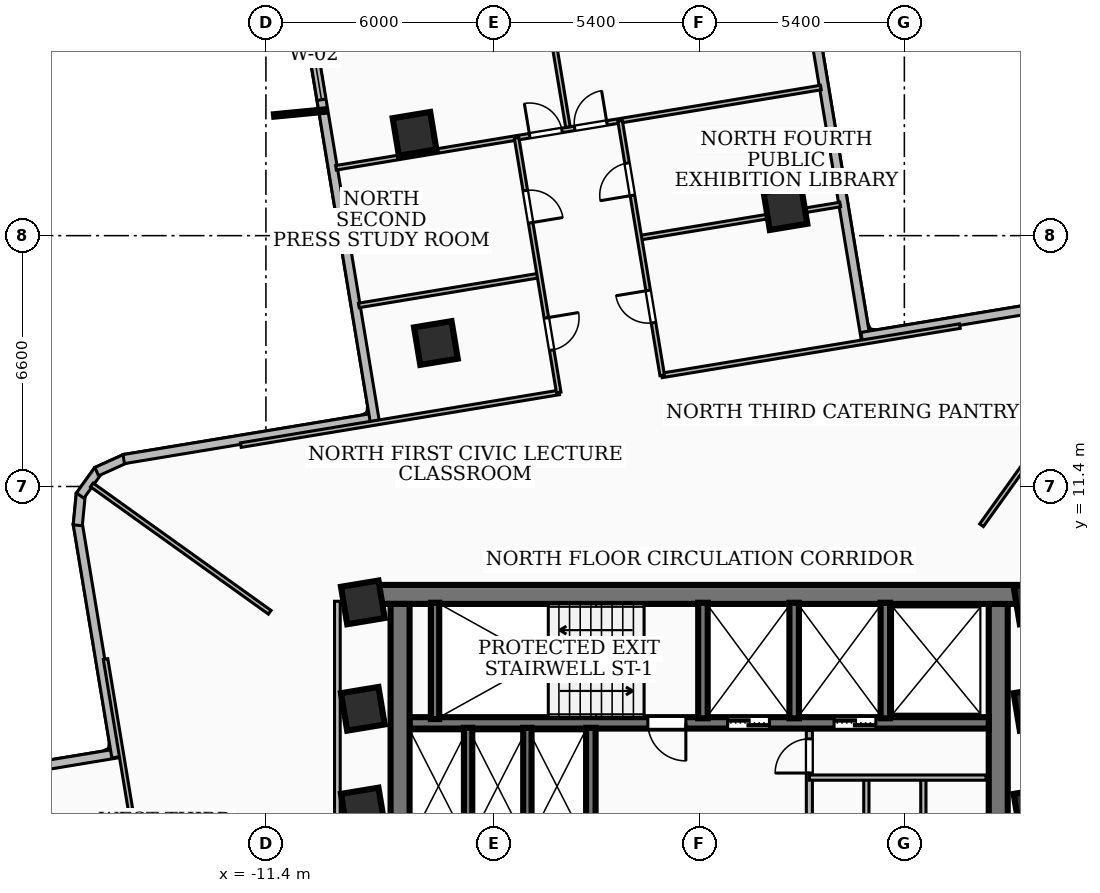
"""IFC4 building model, lengths in metres.
Left out: names, types, materials, properties, quantities, classifications, styles, units other than length and angle.
Written with IfcOpenShell. Run it as: python <this file> out.ifc"""

import sys

from ifc_helpers import new_model, si_unit, direction, frame, frame_2d, origin, origin_2d, place, context, subcontext, project, spatial, rectangle, extrude, element, fill, save


model = new_model("IFC4")
c1 = context("Model", 3, precision=1e-05, world=origin(), true_north=direction((0.0, 1.0)))
c2 = subcontext(c1, "Body", "Model", "MODEL_VIEW")
j1 = project(units=[si_unit("LENGTHUNIT", "METRE"), si_unit("PLANEANGLEUNIT", "RADIAN")], contexts=[c1])
p1 = place(None, origin())
s1 = spatial("IfcSite", under=j1, at=p1, CompositionType="ELEMENT")
p2 = place(p1, origin())
s2 = spatial("IfcBuilding", under=s1, at=p2, CompositionType="ELEMENT")
p3 = place(p2, frame((0.0, 0.0, 92.88)))
s3 = spatial("IfcBuildingStorey", under=s2, at=p3, CompositionType="ELEMENT", Elevation=92.88)
p4 = place(p3, frame((-8.78, 8.56, 0.0), z_axis=(0.0, 0.0, 1.0), x_axis=(1.0, 0.0, 0.0)))
e1 = element("IfcWall", 1, at=p4, inside=s3, PredefinedType="SHEAR", context=c2, shape_type="SweptSolid", body=[
    extrude(rectangle(XDim=17.56, YDim=0.5, at=frame_2d((8.78, 0.0))), origin(), (0.0, 0.0, 1.0), 3.34),
])
for number, where, z_axis, x_axis in (
    (2, (-7.87, 2.0, 0.0), (0.0, 0.0, 1.0), (0.0, 1.0, 0.0)),
    (3, (7.87, 8.31, 0.0), (0.0, 0.0, 1.0), (0.0, -1.0, 0.0)),
):
    element("IfcWall", number, at=place(p3, frame(where, z_axis=z_axis, x_axis=x_axis)), inside=s3, PredefinedType="SHEAR", context=c2, shape_type="SweptSolid", body=[
        extrude(rectangle(XDim=6.31, YDim=0.5, at=frame_2d((3.155, 0.0))), origin(), (0.0, 0.0, 1.0), 3.34),
    ])
p5 = place(p3, frame((7.62, 5.18, 0.0), z_axis=(0.0, 0.0, 1.0), x_axis=(-1.0, 0.0, 0.0)))
e4 = element("IfcWall", 4, at=p5, inside=s3, PredefinedType="SOLIDWALL", context=c2, shape_type="SweptSolid", body=[
    extrude(rectangle(XDim=15.24, YDim=0.3, at=frame_2d((7.62, 0.0))), origin(), (0.0, 0.0, 1.0), 3.34),
])
p6 = place(p5, frame((5.77, 0.0, 0.0)))
e5 = element("IfcOpeningElement", 5, at=p6, cuts=e4, PredefinedType="OPENING", context=c2, shape_type="SweptSolid", body=[
    extrude(rectangle(XDim=1.1, YDim=2.15, at=frame_2d((0.55, 1.075))), frame((0.0, 0.16, 0.0), z_axis=(0.0, -1.0, 0.0), x_axis=(1.0, 0.0, 0.0)), (0.0, 0.0, 1.0), 0.32),
])
p7 = place(p5, frame((2.97, 0.0, 0.0)))
e6 = element("IfcOpeningElement", 6, at=p7, cuts=e4, PredefinedType="OPENING", context=c2, shape_type="SweptSolid", body=[
    extrude(rectangle(XDim=1.1, YDim=2.15, at=frame_2d((0.55, 1.075))), frame((0.0, 0.16, 0.0), z_axis=(0.0, -1.0, 0.0), x_axis=(1.0, 0.0, 0.0)), (0.0, 0.0, 1.0), 0.32),
])
p8 = place(p5, frame((7.97, 0.0, 0.0)))
e7 = element("IfcOpeningElement", 7, at=p8, cuts=e4, PredefinedType="OPENING", context=c2, shape_type="SweptSolid", body=[
    extrude(rectangle(XDim=1.0, YDim=2.1, at=frame_2d((0.5, 1.05))), frame((0.0, 0.16, 0.0), z_axis=(0.0, -1.0, 0.0), x_axis=(1.0, 0.0, 0.0)), (0.0, 0.0, 1.0), 0.32),
])
p9 = place(p3, frame((-6.95, 5.28, 0.0), z_axis=(0.0, 0.0, 1.0), x_axis=(0.0, 1.0, 0.0)))
e8 = element("IfcWall", 8, at=p9, inside=s3, PredefinedType="SOLIDWALL", context=c2, shape_type="SweptSolid", body=[
    extrude(rectangle(XDim=3.06, YDim=0.22, at=frame_2d((1.53, 0.0))), origin(), (0.0, 0.0, 1.0), 3.34),
])
for number, where, z_axis, x_axis in (
    (9, (0.1, 5.3, 0.0), (0.0, 0.0, 1.0), (0.0, 1.0, 0.0)),
    (10, (2.5, 5.3, 0.0), (0.0, 0.0, 1.0), (0.0, 1.0, 0.0)),
    (11, (4.9, 5.3, 0.0), (0.0, 0.0, 1.0), (0.0, 1.0, 0.0)),
):
    element("IfcWall", number, at=place(p3, frame(where, z_axis=z_axis, x_axis=x_axis)), inside=s3, PredefinedType="SOLIDWALL", context=c2, shape_type="SweptSolid", body=[
        extrude(rectangle(XDim=3.04, YDim=0.25, at=frame_2d((1.52, 0.0))), origin(), (0.0, 0.0, 1.0), 3.34),
    ])
p10 = place(p3, frame((-2.85, 1.98, 0.0), z_axis=(0.0, 0.0, 1.0), x_axis=(0.0, 1.0, 0.0)))
e12 = element("IfcWall", 12, at=p10, inside=s3, PredefinedType="SOLIDWALL", context=c2, shape_type="SweptSolid", body=[
    extrude(rectangle(XDim=3.07, YDim=0.25, at=frame_2d((1.535, 0.0))), origin(), (0.0, 0.0, 1.0), 3.34),
])
for number, where, z_axis, x_axis in (
    (13, (-6.08, 1.98, 0.0), (0.0, 0.0, 1.0), (0.0, 1.0, 0.0)),
    (14, (-4.52, 1.98, 0.0), (0.0, 0.0, 1.0), (0.0, 1.0, 0.0)),
):
    element("IfcWall", number, at=place(p3, frame(where, z_axis=z_axis, x_axis=x_axis)), inside=s3, PredefinedType="SOLIDWALL", context=c2, shape_type="SweptSolid", body=[
        extrude(rectangle(XDim=3.07, YDim=0.22, at=frame_2d((1.535, 0.0))), origin(), (0.0, 0.0, 1.0), 3.34),
    ])
for number, where, z_axis, x_axis in (
    (15, (-8.85, 2.9, 0.0), (0.0, 0.0, 1.0), (0.987, 0.163, 0.0)),
    (16, (-8.85, 5.55, 0.0), (0.0, 0.0, 1.0), (0.987, 0.163, 0.0)),
    (17, (8.85, 2.9, 0.0), (0.0, 0.0, 1.0), (0.987, 0.163, 0.0)),
    (18, (8.85, 5.55, 0.0), (0.0, 0.0, 1.0), (0.987, 0.163, 0.0)),
    (19, (-8.85, 8.35, 0.0), (0.0, 0.0, 1.0), (0.987, 0.163, 0.0)),
    (20, (8.85, 8.35, 0.0), (0.0, 0.0, 1.0), (0.987, 0.163, 0.0)),
    (21, (2.271, 18.724, 0.0), (0.0, 0.0, 1.0), (0.987, 0.163, 0.0)),
    (22, (-6.927, 15.175, 0.0), (0.0, 0.0, 1.0), (0.987, 0.163, 0.0)),
    (23, (-7.489, 20.679, 0.0), (0.0, 0.0, 1.0), (0.987, 0.163, 0.0)),
):
    element("IfcColumn", number, at=place(p3, frame(where, z_axis=z_axis, x_axis=x_axis)), inside=s3, PredefinedType="COLUMN", context=c2, shape_type="SweptSolid", body=[
        extrude(rectangle(XDim=1.0, YDim=1.0, at=origin_2d()), origin(), (0.0, 0.0, 1.0), 3.6),
    ])
p11 = place(p3, frame((-31.312, 1.729, 0.0), z_axis=(0.0, 0.0, 1.0), x_axis=(0.986572947557, 0.163321214629, 0.0)))
e24 = element("IfcWall", 24, at=p11, inside=s3, PredefinedType="SOLIDWALL", context=c2, shape_type="SweptSolid", body=[
    extrude(rectangle(XDim=16.274, YDim=0.24, at=frame_2d((8.137, 0.0))), origin(), (0.0, 0.0, 1.0), 3.34),
])
p12 = place(p11, frame((1.1, 0.0, 0.85)))
e25 = element("IfcOpeningElement", 25, at=p12, cuts=e24, PredefinedType="OPENING", context=c2, shape_type="SweptSolid", body=[
    extrude(rectangle(XDim=2.4, YDim=1.85, at=frame_2d((1.2, 0.925))), frame((0.0, 0.13, 0.0), z_axis=(0.0, -1.0, 0.0), x_axis=(1.0, 0.0, 0.0)), (0.0, 0.0, 1.0), 0.26),
])
p13 = place(p3, frame((-15.335, 4.276, 0.0), z_axis=(0.0, 0.0, 1.0), x_axis=(-0.16323720082, 0.986586851863, 0.0)))
e26 = element("IfcWall", 26, at=p13, inside=s3, PredefinedType="SOLIDWALL", context=c2, shape_type="SweptSolid", body=[
    extrude(rectangle(XDim=6.237, YDim=0.24, at=frame_2d((3.118, 0.0))), origin(), (0.0, 0.0, 1.0), 3.34),
])
p14 = place(p3, frame((-16.351, 10.379, 0.0), z_axis=(0.0, 0.0, 1.0), x_axis=(0.096474594184, 0.995335447313, 0.0)))
e27 = element("IfcWall", 27, at=p14, inside=s3, PredefinedType="SOLIDWALL", context=c2, shape_type="SweptSolid", body=[
    extrude(rectangle(XDim=0.83, YDim=0.24, at=frame_2d((0.415, 0.0))), origin(), (0.0, 0.0, 1.0), 3.34),
])
p15 = place(p3, frame((-16.288, 11.16, 0.0), z_axis=(0.0, 0.0, 1.0), x_axis=(0.583561896965, 0.812068662375, 0.0)))
e28 = element("IfcWall", 28, at=p15, inside=s3, PredefinedType="SOLIDWALL", context=c2, shape_type="SweptSolid", body=[
    extrude(rectangle(XDim=0.814, YDim=0.24, at=frame_2d((0.407, 0.0))), origin(), (0.0, 0.0, 1.0), 3.34),
])
p16 = place(p3, frame((-15.851, 11.791, 0.0), z_axis=(0.0, 0.0, 1.0), x_axis=(0.910868773958, 0.412696106872, 0.0)))
e29 = element("IfcWall", 29, at=p16, inside=s3, PredefinedType="SOLIDWALL", context=c2, shape_type="SweptSolid", body=[
    extrude(rectangle(XDim=0.831, YDim=0.24, at=frame_2d((0.416, 0.0))), origin(), (0.0, 0.0, 1.0), 3.34),
])
p17 = place(p3, frame((-15.142, 12.12, 0.0), z_axis=(0.0, 0.0, 1.0), x_axis=(0.986586085056, 0.163241835244, 0.0)))
e30 = element("IfcWall", 30, at=p17, inside=s3, PredefinedType="SOLIDWALL", context=c2, shape_type="SweptSolid", body=[
    extrude(rectangle(XDim=6.775, YDim=0.24, at=frame_2d((3.387, 0.0))), origin(), (0.0, 0.0, 1.0), 3.34),
])
p18 = place(p3, frame((-8.537, 13.115, 0.0), z_axis=(0.0, 0.0, 1.0), x_axis=(-0.163290786455, 0.986577984276, 0.0)))
e31 = element("IfcWall", 31, at=p18, inside=s3, PredefinedType="SOLIDWALL", context=c2, shape_type="SweptSolid", body=[
    extrude(rectangle(XDim=12.076, YDim=0.24, at=frame_2d((6.038, 0.0))), origin(), (0.0, 0.0, 1.0), 3.34),
])
p19 = place(p18, frame((8.576, 0.0, 0.85)))
e32 = element("IfcOpeningElement", 32, at=p19, cuts=e31, PredefinedType="OPENING", context=c2, shape_type="SweptSolid", body=[
    extrude(rectangle(XDim=2.4, YDim=2.1, at=frame_2d((1.2, 1.05))), frame((0.0, 0.13, 0.0), z_axis=(0.0, -1.0, 0.0), x_axis=(1.0, 0.0, 0.0)), (0.0, 0.0, 1.0), 0.26),
])
p20 = place(p3, frame((2.415, 27.169, 0.0), z_axis=(0.0, 0.0, 1.0), x_axis=(0.163307072567, -0.986575288587, 0.0)))
e33 = element("IfcWall", 33, at=p20, inside=s3, PredefinedType="SOLIDWALL", context=c2, shape_type="SweptSolid", body=[
    extrude(rectangle(XDim=12.075, YDim=0.24, at=frame_2d((6.038, 0.0))), origin(), (0.0, 0.0, 1.0), 2.486),
])
p21 = place(p3, frame((4.276, 15.335, 0.0), z_axis=(0.0, 0.0, 1.0), x_axis=(0.986586851863, 0.16323720082, 0.0)))
e34 = element("IfcWall", 34, at=p21, inside=s3, PredefinedType="SOLIDWALL", context=c2, shape_type="SweptSolid", body=[
    extrude(rectangle(XDim=6.237, YDim=0.24, at=frame_2d((3.118, 0.0))), origin(), (0.0, 0.0, 1.0), 2.486),
])
p22 = place(p3, frame((2.9, 2.04, 0.0), z_axis=(0.0, 0.0, 1.0), x_axis=(0.0, 1.0, 0.0)))
e35 = element("IfcWall", 35, at=p22, inside=s3, PredefinedType="PARTITIONING", context=c2, shape_type="SweptSolid", body=[
    extrude(rectangle(XDim=2.94, YDim=0.16, at=frame_2d((1.47, 0.0))), origin(), (0.0, 0.0, 1.0), 2.405),
])
p23 = place(p22, frame((1.82, 0.0, 0.0)))
e36 = element("IfcOpeningElement", 36, at=p23, cuts=e35, PredefinedType="OPENING", context=c2, shape_type="SweptSolid", body=[
    extrude(rectangle(XDim=0.9, YDim=2.06, at=frame_2d((0.45, 1.03))), frame((0.0, 0.09, 0.0), z_axis=(0.0, -1.0, 0.0), x_axis=(1.0, 0.0, 0.0)), (0.0, 0.0, 1.0), 0.18),
])
p24 = place(p3, frame((2.9, 3.74, 0.0), z_axis=(0.0, 0.0, 1.0), x_axis=(1.0, 0.0, 0.0)))
e37 = element("IfcWall", 37, at=p24, inside=s3, PredefinedType="PARTITIONING", context=c2, shape_type="SweptSolid", body=[
    extrude(rectangle(XDim=4.65, YDim=0.138, at=frame_2d((2.325, 0.0))), origin(), (0.0, 0.0, 1.0), 3.34),
])
for number, where, z_axis, x_axis in (
    (38, (4.4, 1.85, 0.0), (0.0, 0.0, 1.0), (0.0, 1.0, 0.0)),
    (39, (5.9, 1.85, 0.0), (0.0, 0.0, 1.0), (0.0, 1.0, 0.0)),
):
    element("IfcWall", number, at=place(p3, frame(where, z_axis=z_axis, x_axis=x_axis)), inside=s3, PredefinedType="PARTITIONING", context=c2, shape_type="SweptSolid", body=[
        extrude(rectangle(XDim=1.89, YDim=0.138, at=frame_2d((0.945, 0.0))), origin(), (0.0, 0.0, 1.0), 2.405),
    ])
p25 = place(p3, frame((-9.52, 1.75, 0.0), z_axis=(0.0, 0.0, 1.0), x_axis=(0.0, 1.0, 0.0)))
e40 = element("IfcWall", 40, at=p25, inside=s3, PredefinedType="PARTITIONING", context=c2, shape_type="SweptSolid", body=[
    extrude(rectangle(XDim=6.63, YDim=0.15, at=frame_2d((3.315, 0.0))), origin(), (0.0, 0.0, 1.0), 2.486),
])
p26 = place(p3, frame((7.431, 10.38, 0.0), z_axis=(0.0, 0.0, 1.0), x_axis=(0.582126278944, 0.813098392178, 0.0)))
e41 = element("IfcWall", 41, at=p26, inside=s3, PredefinedType="PARTITIONING", context=c2, shape_type="SweptSolid", body=[
    extrude(rectangle(XDim=6.889, YDim=0.12, at=frame_2d((3.444, 0.0))), origin(), (0.0, 0.0, 1.0), 2.486),
])
p27 = place(p3, frame((-11.3, 8.09, 0.0), z_axis=(0.0, 0.0, 1.0), x_axis=(-0.813131268368, 0.582080355623, 0.0)))
e42 = element("IfcWall", 42, at=p27, inside=s3, PredefinedType="PARTITIONING", context=c2, shape_type="SweptSolid", body=[
    extrude(rectangle(XDim=5.757, YDim=0.12, at=frame_2d((2.878, 0.0))), origin(), (0.0, 0.0, 1.0), 3.34),
])
p28 = place(p3, frame((-3.686, 13.874, 0.0), z_axis=(0.0, 0.0, 1.0), x_axis=(-0.98658138377, -0.163270245909, 0.0)))
e43 = element("IfcWall", 43, at=p28, inside=s3, PredefinedType="PARTITIONING", context=c2, shape_type="SweptSolid", body=[
    extrude(rectangle(XDim=8.489, YDim=0.12, at=frame_2d((4.245, 0.0))), origin(), (0.0, 0.0, 1.0), 2.486),
])
p29 = place(p3, frame((6.86, 15.62, 0.0), z_axis=(0.0, 0.0, 1.0), x_axis=(-0.986575116384, -0.16330811288, 0.0)))
e44 = element("IfcWall", 44, at=p29, inside=s3, PredefinedType="PARTITIONING", context=c2, shape_type="SweptSolid", body=[
    extrude(rectangle(XDim=7.949, YDim=0.12, at=frame_2d((3.974, 0.0))), origin(), (0.0, 0.0, 1.0), 2.486),
])
p30 = place(p3, frame((-4.225, 16.948, 0.0), z_axis=(0.0, 0.0, 1.0), x_axis=(-0.986542154764, -0.163507115668, 0.0)))
e45 = element("IfcWall", 45, at=p30, inside=s3, PredefinedType="PARTITIONING", context=c2, shape_type="SweptSolid", body=[
    extrude(rectangle(XDim=4.794, YDim=0.12, at=frame_2d((2.397, 0.0))), origin(), (0.0, 0.0, 1.0), 2.486),
])
p31 = place(p3, frame((3.711, 18.819, 0.0), z_axis=(0.0, 0.0, 1.0), x_axis=(-0.986548097851, -0.163471253213, 0.0)))
e46 = element("IfcWall", 46, at=p31, inside=s3, PredefinedType="PARTITIONING", context=c2, shape_type="SweptSolid", body=[
    extrude(rectangle(XDim=5.335, YDim=0.12, at=frame_2d((2.667, 0.0))), origin(), (0.0, 0.0, 1.0), 2.486),
])
p32 = place(p3, frame((-4.804, 20.572, 0.0), z_axis=(0.0, 0.0, 1.0), x_axis=(0.163308569386, -0.986575040818, 0.0)))
e47 = element("IfcWall", 47, at=p32, inside=s3, PredefinedType="PARTITIONING", context=c2, shape_type="SweptSolid", body=[
    extrude(rectangle(XDim=6.79, YDim=0.12, at=frame_2d((3.395, 0.0))), origin(), (0.0, 0.0, 1.0), 3.34),
])
p33 = place(p32, frame((4.8, 0.0, 0.0)))
e48 = element("IfcOpeningElement", 48, at=p33, cuts=e47, PredefinedType="OPENING", context=c2, shape_type="SweptSolid", body=[
    extrude(rectangle(XDim=0.86, YDim=2.04, at=frame_2d((0.43, 1.02))), frame((0.0, 0.07, 0.0), z_axis=(0.0, -1.0, 0.0), x_axis=(1.0, 0.0, 0.0)), (0.0, 0.0, 1.0), 0.14),
])
p34 = place(p32, frame((1.405, 0.0, 0.0)))
e49 = element("IfcOpeningElement", 49, at=p34, cuts=e47, PredefinedType="OPENING", context=c2, shape_type="SweptSolid", body=[
    extrude(rectangle(XDim=0.86, YDim=2.04, at=frame_2d((0.43, 1.02))), frame((0.0, 0.07, 0.0), z_axis=(0.0, -1.0, 0.0), x_axis=(1.0, 0.0, 0.0)), (0.0, 0.0, 1.0), 0.14),
])
p35 = place(p3, frame((-0.972, 14.324, 0.0), z_axis=(0.0, 0.0, 1.0), x_axis=(-0.163366745174, 0.98656540917, 0.0)))
e50 = element("IfcWall", 50, at=p35, inside=s3, PredefinedType="PARTITIONING", context=c2, shape_type="SweptSolid", body=[
    extrude(rectangle(XDim=6.789, YDim=0.12, at=frame_2d((3.395, 0.0))), origin(), (0.0, 0.0, 1.0), 3.34),
])
p36 = place(p35, frame((1.405, 0.0, 0.0)))
e51 = element("IfcOpeningElement", 51, at=p36, cuts=e50, PredefinedType="OPENING", context=c2, shape_type="SweptSolid", body=[
    extrude(rectangle(XDim=0.86, YDim=2.04, at=frame_2d((0.43, 1.02))), frame((0.0, 0.07, 0.0), z_axis=(0.0, -1.0, 0.0), x_axis=(1.0, 0.0, 0.0)), (0.0, 0.0, 1.0), 0.14),
])
p37 = place(p35, frame((4.8, 0.0, 0.0)))
e52 = element("IfcOpeningElement", 52, at=p37, cuts=e50, PredefinedType="OPENING", context=c2, shape_type="SweptSolid", body=[
    extrude(rectangle(XDim=0.86, YDim=2.04, at=frame_2d((0.43, 1.02))), frame((0.0, 0.07, 0.0), z_axis=(0.0, -1.0, 0.0), x_axis=(1.0, 0.0, 0.0)), (0.0, 0.0, 1.0), 0.14),
])
p38 = place(p3, frame((-3.453, 20.856, 0.0), z_axis=(0.0, 0.0, 1.0), x_axis=(-0.163346014225, 0.986568841813, 0.0)))
e53 = element("IfcWall", 53, at=p38, inside=s3, PredefinedType="PARTITIONING", context=c2, shape_type="SweptSolid", body=[
    extrude(rectangle(XDim=6.656, YDim=0.12, at=frame_2d((3.328, 0.0))), origin(), (0.0, 0.0, 1.0), 2.832),
])
p39 = place(p3, frame((-9.555, 19.786, 0.0), z_axis=(0.0, 0.0, 1.0), x_axis=(0.98658208559, 0.163266005016, 0.0)))
e54 = element("IfcWall", 54, at=p39, inside=s3, PredefinedType="PARTITIONING", context=c2, shape_type="SweptSolid", body=[
    extrude(rectangle(XDim=12.93, YDim=0.12, at=frame_2d((6.465, 0.0))), origin(), (0.0, 0.0, 1.0), 2.486),
])
p40 = place(p39, frame((6.365, 0.0, 0.0)))
e55 = element("IfcOpeningElement", 55, at=p40, cuts=e54, PredefinedType="OPENING", context=c2, shape_type="SweptSolid", body=[
    extrude(rectangle(XDim=0.86, YDim=2.04, at=frame_2d((0.43, 1.02))), frame((0.0, 0.07, 0.0), z_axis=(0.0, -1.0, 0.0), x_axis=(1.0, 0.0, 0.0)), (0.0, 0.0, 1.0), 0.14),
])
p41 = place(p39, frame((5.165, 0.0, 0.0)))
e56 = element("IfcOpeningElement", 56, at=p41, cuts=e54, PredefinedType="OPENING", context=c2, shape_type="SweptSolid", body=[
    extrude(rectangle(XDim=0.86, YDim=2.04, at=frame_2d((0.43, 1.02))), frame((0.0, 0.07, 0.0), z_axis=(0.0, -1.0, 0.0), x_axis=(1.0, 0.0, 0.0)), (0.0, 0.0, 1.0), 0.14),
])
p42 = place(p3, frame((-15.62, 6.86, 0.0), z_axis=(0.0, 0.0, 1.0), x_axis=(0.16330811288, -0.986575116384, 0.0)))
e57 = element("IfcWall", 57, at=p42, inside=s3, PredefinedType="PARTITIONING", context=c2, shape_type="SweptSolid", body=[
    extrude(rectangle(XDim=7.949, YDim=0.12, at=frame_2d((3.974, 0.0))), origin(), (0.0, 0.0, 1.0), 2.486),
])
p43 = place(p3, frame((-17.842, 3.873, 0.0), z_axis=(0.0, 0.0, 1.0), x_axis=(0.16329307855, -0.986577604904, 0.0)))
e58 = element("IfcWall", 58, at=p43, inside=s3, PredefinedType="PARTITIONING", context=c2, shape_type="SweptSolid", body=[
    extrude(rectangle(XDim=5.334, YDim=0.12, at=frame_2d((2.667, 0.0))), origin(), (0.0, 0.0, 1.0), 2.486),
])
p44 = place(p19, origin())
e59 = element("IfcWindow", 59, at=p44, inside=s3, PartitioningType="SINGLE_PANEL", PredefinedType="WINDOW", context=c2, shape_type="SweptSolid", body=[
    extrude(rectangle(XDim=2.4, YDim=2.1, at=frame_2d((1.2, 1.05))), frame((0.0, 0.03, 0.0), z_axis=(0.0, -1.0, 0.0), x_axis=(1.0, 0.0, 0.0)), (0.0, 0.0, 1.0), 0.06),
])
fill(e32, e59)
p45 = place(p6, origin())
e60 = element("IfcDoor", 60, at=p45, inside=s3, OperationType="DOUBLE_DOOR_SLIDING", PredefinedType="DOOR", context=c2, shape_type="SweptSolid", body=[
    extrude(rectangle(XDim=1.1, YDim=2.15, at=frame_2d((0.55, 1.075))), frame((0.0, 0.025, 0.0), z_axis=(0.0, -1.0, 0.0), x_axis=(1.0, 0.0, 0.0)), (0.0, 0.0, 1.0), 0.05),
])
fill(e5, e60)
p46 = place(p7, origin())
e61 = element("IfcDoor", 61, at=p46, inside=s3, OperationType="DOUBLE_DOOR_SLIDING", PredefinedType="DOOR", context=c2, shape_type="SweptSolid", body=[
    extrude(rectangle(XDim=1.1, YDim=2.15, at=frame_2d((0.55, 1.075))), frame((0.0, 0.025, 0.0), z_axis=(0.0, -1.0, 0.0), x_axis=(1.0, 0.0, 0.0)), (0.0, 0.0, 1.0), 0.05),
])
fill(e6, e61)
p47 = place(p8, origin())
e62 = element("IfcDoor", 62, at=p47, inside=s3, OperationType="SINGLE_SWING_LEFT", PredefinedType="DOOR", context=c2, shape_type="SweptSolid", body=[
    extrude(rectangle(XDim=1.0, YDim=2.1, at=frame_2d((0.5, 1.05))), frame((0.0, 0.025, 0.0), z_axis=(0.0, -1.0, 0.0), x_axis=(1.0, 0.0, 0.0)), (0.0, 0.0, 1.0), 0.05),
])
fill(e7, e62)
p48 = place(p23, origin())
e63 = element("IfcDoor", 63, at=p48, inside=s3, OperationType="SINGLE_SWING_LEFT", PredefinedType="DOOR", context=c2, shape_type="SweptSolid", body=[
    extrude(rectangle(XDim=0.9, YDim=2.06, at=frame_2d((0.45, 1.03))), frame((0.0, 0.025, 0.0), z_axis=(0.0, -1.0, 0.0), x_axis=(1.0, 0.0, 0.0)), (0.0, 0.0, 1.0), 0.05),
])
fill(e36, e63)
p49 = place(p33, origin())
e64 = element("IfcDoor", 64, at=p49, inside=s3, OperationType="SINGLE_SWING_LEFT", PredefinedType="DOOR", context=c2, shape_type="SweptSolid", body=[
    extrude(rectangle(XDim=0.86, YDim=2.04, at=frame_2d((0.43, 1.02))), frame((0.0, 0.025, 0.0), z_axis=(0.0, -1.0, 0.0), x_axis=(1.0, 0.0, 0.0)), (0.0, 0.0, 1.0), 0.05),
])
fill(e48, e64)
p50 = place(p34, origin())
e65 = element("IfcDoor", 65, at=p50, inside=s3, OperationType="SINGLE_SWING_RIGHT", PredefinedType="DOOR", context=c2, shape_type="SweptSolid", body=[
    extrude(rectangle(XDim=0.86, YDim=2.04, at=frame_2d((0.43, 1.02))), frame((0.0, 0.025, 0.0), z_axis=(0.0, -1.0, 0.0), x_axis=(1.0, 0.0, 0.0)), (0.0, 0.0, 1.0), 0.05),
])
fill(e49, e65)
p51 = place(p36, origin())
e66 = element("IfcDoor", 66, at=p51, inside=s3, OperationType="SINGLE_SWING_RIGHT", PredefinedType="DOOR", context=c2, shape_type="SweptSolid", body=[
    extrude(rectangle(XDim=0.86, YDim=2.04, at=frame_2d((0.43, 1.02))), frame((0.0, 0.025, 0.0), z_axis=(0.0, -1.0, 0.0), x_axis=(1.0, 0.0, 0.0)), (0.0, 0.0, 1.0), 0.05),
])
fill(e51, e66)
p52 = place(p37, origin())
e67 = element("IfcDoor", 67, at=p52, inside=s3, OperationType="SINGLE_SWING_LEFT", PredefinedType="DOOR", context=c2, shape_type="SweptSolid", body=[
    extrude(rectangle(XDim=0.86, YDim=2.04, at=frame_2d((0.43, 1.02))), frame((0.0, 0.025, 0.0), z_axis=(0.0, -1.0, 0.0), x_axis=(1.0, 0.0, 0.0)), (0.0, 0.0, 1.0), 0.05),
])
fill(e52, e67)
p53 = place(p40, origin())
e68 = element("IfcDoor", 68, at=p53, inside=s3, OperationType="SINGLE_SWING_RIGHT", PredefinedType="DOOR", context=c2, shape_type="SweptSolid", body=[
    extrude(rectangle(XDim=0.86, YDim=2.04, at=frame_2d((0.43, 1.02))), frame((0.0, 0.025, 0.0), z_axis=(0.0, -1.0, 0.0), x_axis=(1.0, 0.0, 0.0)), (0.0, 0.0, 1.0), 0.05),
])
fill(e55, e68)
p54 = place(p41, origin())
e69 = element("IfcDoor", 69, at=p54, inside=s3, OperationType="SINGLE_SWING_LEFT", PredefinedType="DOOR", context=c2, shape_type="SweptSolid", body=[
    extrude(rectangle(XDim=0.86, YDim=2.04, at=frame_2d((0.43, 1.02))), frame((0.0, 0.025, 0.0), z_axis=(0.0, -1.0, 0.0), x_axis=(1.0, 0.0, 0.0)), (0.0, 0.0, 1.0), 0.05),
])
fill(e56, e69)
save(model, sys.argv[1])
